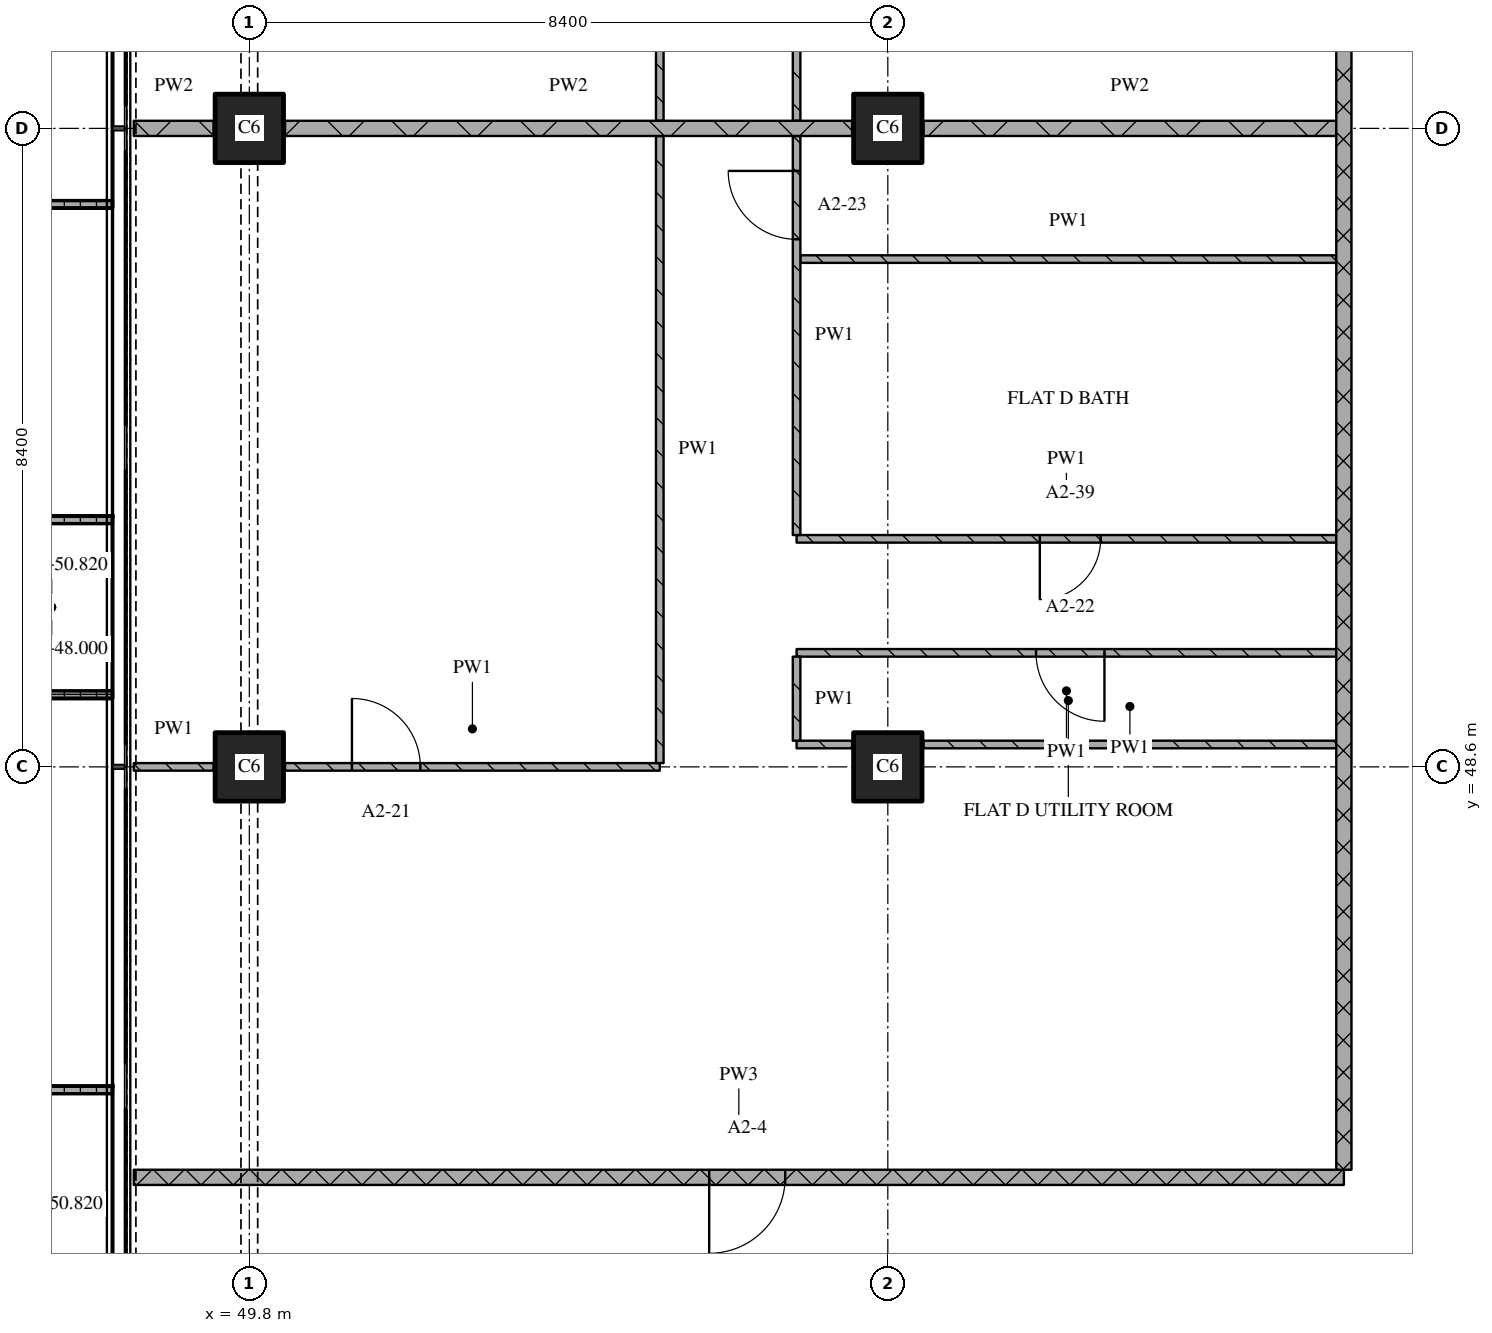
"""IFC4 building model, lengths in metres.
Left out: names, types, materials, properties, quantities, classifications, styles, units other than length and angle.
Written with IfcOpenShell. Run it as: python <this file> out.ifc"""

import sys

from ifc_helpers import new_model, si_unit, direction, frame, frame_2d, origin, origin_2d, place, context, subcontext, project, spatial, polyline, rectangle, outline, extrude, element, fill, save


model = new_model("IFC4")
c1 = context("Model", 3, precision=1e-05, world=origin(), true_north=direction((0.0, 1.0)))
c2 = subcontext(c1, "Body", "Model", "MODEL_VIEW")
j1 = project(units=[si_unit("LENGTHUNIT", "METRE"), si_unit("PLANEANGLEUNIT", "RADIAN")], contexts=[c1])
p1 = place(None, origin())
s1 = spatial("IfcSite", under=j1, at=p1, CompositionType="ELEMENT")
p2 = place(p1, origin())
s2 = spatial("IfcBuilding", under=s1, at=p2, CompositionType="ELEMENT")
p3 = place(p2, frame((0.0, 0.0, 48.0)))
s3 = spatial("IfcBuildingStorey", under=s2, at=p3, CompositionType="ELEMENT", Elevation=48.0)
for number, where, z_axis, x_axis in (
    (1, (49.8, 48.6, 0.0), (0.0, 0.0, 1.0), (1.0, 0.0, 0.0)),
    (2, (49.8, 57.0, 0.0), (0.0, 0.0, 1.0), (1.0, 0.0, 0.0)),
    (3, (58.2, 48.6, 0.0), (0.0, 0.0, 1.0), (1.0, 0.0, 0.0)),
    (4, (58.2, 57.0, 0.0), (0.0, 0.0, 1.0), (1.0, 0.0, 0.0)),
):
    element("IfcColumn", number, at=place(p3, frame(where, z_axis=z_axis, x_axis=x_axis)), inside=s3, PredefinedType="COLUMN", context=c2, shape_type="SweptSolid", body=[
        extrude(rectangle(XDim=0.9, YDim=0.9, at=origin_2d()), origin(), (0.0, 0.0, 1.0), 3.6),
    ])
p4 = place(p3, origin())
e5 = element("IfcWall", 5, at=p4, inside=s3, PredefinedType="SOLIDWALL", context=c2, shape_type="SweptSolid", body=[
    extrude(outline(polyline([(48.0, 62.25), (48.0, 62.15), (46.233, 62.15), (46.233, 56.05), (48.0, 56.05), (48.0, 55.95), (46.133, 55.95), (46.133, 62.25), (48.0, 62.25)])), origin(), (0.0, 0.0, 1.0), 1.0),
])
p5 = place(p3, origin())
e6 = element("IfcWall", 6, at=p5, inside=s3, PredefinedType="SOLIDWALL", context=c2, shape_type="SweptSolid", body=[
    extrude(outline(polyline([(48.0, 51.9), (48.0, 51.8), (46.5, 51.8), (46.5, 49.6), (48.0, 49.6), (48.0, 49.5), (46.4, 49.5), (46.4, 51.9), (48.0, 51.9)])), origin(), (0.0, 0.0, 1.0), 1.0),
])
p6 = place(p3, origin())
e7 = element("IfcWall", 7, at=p6, inside=s3, PredefinedType="SOLIDWALL", context=c2, shape_type="SweptSolid", body=[
    extrude(outline(polyline([(48.0, 44.4), (48.0, 44.3), (46.367, 44.3), (46.367, 40.3), (48.0, 40.3), (48.0, 40.2), (46.267, 40.2), (46.267, 44.4), (48.0, 44.4)])), origin(), (0.0, 0.0, 1.0), 1.0),
])
p7 = place(p3, frame((48.28, 43.2, 0.0), z_axis=(0.0, 0.0, 1.0), x_axis=(1.0, 0.0, 0.0)))
e8 = element("IfcWall", 8, at=p7, inside=s3, PredefinedType="PARTITIONING", context=c2, shape_type="SweptSolid", body=[
    extrude(rectangle(XDim=15.92, YDim=0.2, at=frame_2d((7.96, 0.0))), origin(), (0.0, 0.0, 1.0), 3.32),
])
p8 = place(p7, frame((7.57, 0.0, 0.0)))
e9 = element("IfcOpeningElement", 9, at=p8, cuts=e8, PredefinedType="OPENING", context=c2, shape_type="SweptSolid", body=[
    extrude(rectangle(XDim=1.0, YDim=2.1, at=frame_2d((0.5, 1.05))), frame((0.0, 0.11, 0.0), z_axis=(0.0, -1.0, 0.0), x_axis=(1.0, 0.0, 0.0)), (0.0, 0.0, 1.0), 0.22),
])
p9 = place(p3, frame((48.28, 48.6, 0.0), z_axis=(0.0, 0.0, 1.0), x_axis=(1.0, 0.0, 0.0)))
e10 = element("IfcWall", 10, at=p9, inside=s3, PredefinedType="PARTITIONING", context=c2, shape_type="SweptSolid", body=[
    extrude(rectangle(XDim=1.05, YDim=0.1, at=frame_2d((0.525, 0.0))), origin(), (0.0, 0.0, 1.0), 3.32),
])
p10 = place(p3, frame((50.27, 48.6, 0.0), z_axis=(0.0, 0.0, 1.0), x_axis=(1.0, 0.0, 0.0)))
e11 = element("IfcWall", 11, at=p10, inside=s3, PredefinedType="PARTITIONING", context=c2, shape_type="SweptSolid", body=[
    extrude(rectangle(XDim=4.93, YDim=0.1, at=frame_2d((2.465, 0.0))), origin(), (0.0, 0.0, 1.0), 3.32),
])
p11 = place(p10, frame((0.88, 0.0, 0.0)))
e12 = element("IfcOpeningElement", 12, at=p11, cuts=e11, PredefinedType="OPENING", context=c2, shape_type="SweptSolid", body=[
    extrude(rectangle(XDim=0.9, YDim=2.1, at=frame_2d((0.45, 1.05))), frame((0.0, 0.06, 0.0), z_axis=(0.0, -1.0, 0.0), x_axis=(1.0, 0.0, 0.0)), (0.0, 0.0, 1.0), 0.12),
])
p12 = place(p3, frame((57.0, 48.894, 0.0), z_axis=(0.0, 0.0, 1.0), x_axis=(1.0, 0.0, 0.0)))
e13 = element("IfcWall", 13, at=p12, inside=s3, PredefinedType="PARTITIONING", context=c2, shape_type="SweptSolid", body=[
    extrude(rectangle(XDim=0.73, YDim=0.1, at=frame_2d((0.365, 0.0))), origin(), (0.0, 0.0, 1.0), 3.32),
])
p13 = place(p3, frame((58.67, 48.894, 0.0), z_axis=(0.0, 0.0, 1.0), x_axis=(1.0, 0.0, 0.0)))
e14 = element("IfcWall", 14, at=p13, inside=s3, PredefinedType="PARTITIONING", context=c2, shape_type="SweptSolid", body=[
    extrude(rectangle(XDim=5.43, YDim=0.1, at=frame_2d((2.715, 0.0))), origin(), (0.0, 0.0, 1.0), 3.32),
])
p14 = place(p3, frame((64.1, 50.1, 0.0), z_axis=(0.0, 0.0, 1.0), x_axis=(-1.0, 0.0, 0.0)))
e15 = element("IfcWall", 15, at=p14, inside=s3, PredefinedType="PARTITIONING", context=c2, shape_type="SweptSolid", body=[
    extrude(rectangle(XDim=7.1, YDim=0.1, at=frame_2d((3.55, 0.0))), origin(), (0.0, 0.0, 1.0), 3.32),
])
p15 = place(p14, frame((3.05, 0.0, 0.0)))
e16 = element("IfcOpeningElement", 16, at=p15, cuts=e15, PredefinedType="OPENING", context=c2, shape_type="SweptSolid", body=[
    extrude(rectangle(XDim=0.9, YDim=2.1, at=frame_2d((0.45, 1.05))), frame((0.0, 0.06, 0.0), z_axis=(0.0, -1.0, 0.0), x_axis=(1.0, 0.0, 0.0)), (0.0, 0.0, 1.0), 0.12),
])
p16 = place(p3, frame((57.0, 51.6, 0.0), z_axis=(0.0, 0.0, 1.0), x_axis=(1.0, 0.0, 0.0)))
e17 = element("IfcWall", 17, at=p16, inside=s3, PredefinedType="PARTITIONING", context=c2, shape_type="SweptSolid", body=[
    extrude(rectangle(XDim=7.1, YDim=0.1, at=frame_2d((3.55, 0.0))), origin(), (0.0, 0.0, 1.0), 3.32),
])
p17 = place(p16, frame((3.2, 0.0, 0.0)))
e18 = element("IfcOpeningElement", 18, at=p17, cuts=e17, PredefinedType="OPENING", context=c2, shape_type="SweptSolid", body=[
    extrude(rectangle(XDim=0.8, YDim=2.1, at=frame_2d((0.4, 1.05))), frame((0.0, 0.06, 0.0), z_axis=(0.0, -1.0, 0.0), x_axis=(1.0, 0.0, 0.0)), (0.0, 0.0, 1.0), 0.12),
])
p18 = place(p3, frame((57.05, 55.281, 0.0), z_axis=(0.0, 0.0, 1.0), x_axis=(1.0, 0.0, 0.0)))
e19 = element("IfcWall", 19, at=p18, inside=s3, PredefinedType="PARTITIONING", context=c2, shape_type="SweptSolid", body=[
    extrude(rectangle(XDim=7.05, YDim=0.1, at=frame_2d((3.525, 0.0))), origin(), (0.0, 0.0, 1.0), 3.32),
])
p19 = place(p3, frame((48.28, 57.0, 0.0), z_axis=(0.0, 0.0, 1.0), x_axis=(1.0, 0.0, 0.0)))
e20 = element("IfcWall", 20, at=p19, inside=s3, PredefinedType="PARTITIONING", context=c2, shape_type="SweptSolid", body=[
    extrude(rectangle(XDim=1.05, YDim=0.2, at=frame_2d((0.525, 0.0))), origin(), (0.0, 0.0, 1.0), 3.32),
])
p20 = place(p3, frame((50.27, 57.0, 0.0), z_axis=(0.0, 0.0, 1.0), x_axis=(1.0, 0.0, 0.0)))
e21 = element("IfcWall", 21, at=p20, inside=s3, PredefinedType="PARTITIONING", context=c2, shape_type="SweptSolid", body=[
    extrude(rectangle(XDim=7.46, YDim=0.2, at=frame_2d((3.73, 0.0))), origin(), (0.0, 0.0, 1.0), 3.32),
])
p21 = place(p3, frame((58.67, 57.0, 0.0), z_axis=(0.0, 0.0, 1.0), x_axis=(1.0, 0.0, 0.0)))
e22 = element("IfcWall", 22, at=p21, inside=s3, PredefinedType="PARTITIONING", context=c2, shape_type="SweptSolid", body=[
    extrude(rectangle(XDim=5.43, YDim=0.2, at=frame_2d((2.715, 0.0))), origin(), (0.0, 0.0, 1.0), 3.32),
])
p22 = place(p3, frame((57.0, 50.05, 0.0), z_axis=(0.0, 0.0, 1.0), x_axis=(0.0, -1.0, 0.0)))
e23 = element("IfcWall", 23, at=p22, inside=s3, PredefinedType="PARTITIONING", context=c2, shape_type="SweptSolid", body=[
    extrude(rectangle(XDim=1.106, YDim=0.1, at=frame_2d((0.553, 0.0))), origin(), (0.0, 0.0, 1.0), 3.32),
])
p23 = place(p3, frame((64.2, 43.3, 0.0), z_axis=(0.0, 0.0, 1.0), x_axis=(0.0, 1.0, 0.0)))
e24 = element("IfcWall", 24, at=p23, inside=s3, PredefinedType="PARTITIONING", context=c2, shape_type="SweptSolid", body=[
    extrude(rectangle(XDim=32.02, YDim=0.2, at=frame_2d((16.01, 0.0))), origin(), (0.0, 0.0, 1.0), 3.32),
])
p24 = place(p23, frame((19.95, 0.0, 0.0)))
e25 = element("IfcOpeningElement", 25, at=p24, cuts=e24, PredefinedType="OPENING", context=c2, shape_type="SweptSolid", body=[
    extrude(rectangle(XDim=1.0, YDim=2.1, at=frame_2d((0.5, 1.05))), frame((0.0, 0.11, 0.0), z_axis=(0.0, -1.0, 0.0), x_axis=(1.0, 0.0, 0.0)), (0.0, 0.0, 1.0), 0.22),
])
for number, where, z_axis, x_axis in (
    (26, (55.2, 56.9, 0.0), (0.0, 0.0, 1.0), (0.0, -1.0, 0.0)),
    (27, (55.2, 65.35, 0.0), (0.0, 0.0, 1.0), (0.0, -1.0, 0.0)),
):
    element("IfcWall", number, at=place(p3, frame(where, z_axis=z_axis, x_axis=x_axis)), inside=s3, PredefinedType="PARTITIONING", context=c2, shape_type="SweptSolid", body=[
        extrude(rectangle(XDim=8.25, YDim=0.1, at=frame_2d((4.125, 0.0))), origin(), (0.0, 0.0, 1.0), 3.32),
    ])
p25 = place(p3, frame((57.0, 56.9, 0.0), z_axis=(0.0, 0.0, 1.0), x_axis=(0.0, -1.0, 0.0)))
e28 = element("IfcWall", 28, at=p25, inside=s3, PredefinedType="PARTITIONING", context=c2, shape_type="SweptSolid", body=[
    extrude(rectangle(XDim=5.25, YDim=0.1, at=frame_2d((2.625, 0.0))), origin(), (0.0, 0.0, 1.0), 3.32),
])
p26 = place(p25, frame((0.46, 0.0, 0.0)))
e29 = element("IfcOpeningElement", 29, at=p26, cuts=e28, PredefinedType="OPENING", context=c2, shape_type="SweptSolid", body=[
    extrude(rectangle(XDim=0.9, YDim=2.1, at=frame_2d((0.45, 1.05))), frame((0.0, 0.06, 0.0), z_axis=(0.0, -1.0, 0.0), x_axis=(1.0, 0.0, 0.0)), (0.0, 0.0, 1.0), 0.12),
])
p27 = place(p3, frame((57.0, 62.95, 0.0), z_axis=(0.0, 0.0, 1.0), x_axis=(0.0, -1.0, 0.0)))
e30 = element("IfcWall", 30, at=p27, inside=s3, PredefinedType="PARTITIONING", context=c2, shape_type="SweptSolid", body=[
    extrude(rectangle(XDim=5.85, YDim=0.1, at=frame_2d((2.925, 0.0))), origin(), (0.0, 0.0, 1.0), 3.32),
])
p28 = place(p27, frame((3.71, 0.0, 0.0)))
e31 = element("IfcOpeningElement", 31, at=p28, cuts=e30, PredefinedType="OPENING", context=c2, shape_type="SweptSolid", body=[
    extrude(rectangle(XDim=0.8, YDim=2.1, at=frame_2d((0.4, 1.05))), frame((0.0, 0.06, 0.0), z_axis=(0.0, -1.0, 0.0), x_axis=(1.0, 0.0, 0.0)), (0.0, 0.0, 1.0), 0.12),
])
p29 = place(p8, origin())
e32 = element("IfcDoor", 32, at=p29, inside=s3, OperationType="SINGLE_SWING_RIGHT", PredefinedType="DOOR", context=c2, shape_type="SweptSolid", body=[
    extrude(rectangle(XDim=1.0, YDim=2.1, at=frame_2d((0.5, 1.05))), frame((0.0, 0.025, 0.0), z_axis=(0.0, -1.0, 0.0), x_axis=(1.0, 0.0, 0.0)), (0.0, 0.0, 1.0), 0.05),
])
fill(e9, e32)
p30 = place(p11, origin())
e33 = element("IfcDoor", 33, at=p30, inside=s3, OperationType="SINGLE_SWING_LEFT", PredefinedType="DOOR", context=c2, shape_type="SweptSolid", body=[
    extrude(rectangle(XDim=0.9, YDim=2.1, at=frame_2d((0.45, 1.05))), frame((0.0, 0.025, 0.0), z_axis=(0.0, -1.0, 0.0), x_axis=(1.0, 0.0, 0.0)), (0.0, 0.0, 1.0), 0.05),
])
fill(e12, e33)
p31 = place(p15, origin())
e34 = element("IfcDoor", 34, at=p31, inside=s3, OperationType="SINGLE_SWING_LEFT", PredefinedType="DOOR", context=c2, shape_type="SweptSolid", body=[
    extrude(rectangle(XDim=0.9, YDim=2.1, at=frame_2d((0.45, 1.05))), frame((0.0, 0.025, 0.0), z_axis=(0.0, -1.0, 0.0), x_axis=(1.0, 0.0, 0.0)), (0.0, 0.0, 1.0), 0.05),
])
fill(e16, e34)
p32 = place(p17, origin())
e35 = element("IfcDoor", 35, at=p32, inside=s3, OperationType="SINGLE_SWING_RIGHT", PredefinedType="DOOR", context=c2, shape_type="SweptSolid", body=[
    extrude(rectangle(XDim=0.8, YDim=2.1, at=frame_2d((0.4, 1.05))), frame((0.0, 0.025, 0.0), z_axis=(0.0, -1.0, 0.0), x_axis=(1.0, 0.0, 0.0)), (0.0, 0.0, 1.0), 0.05),
])
fill(e18, e35)
p33 = place(p26, origin())
e36 = element("IfcDoor", 36, at=p33, inside=s3, OperationType="SINGLE_SWING_RIGHT", PredefinedType="DOOR", context=c2, shape_type="SweptSolid", body=[
    extrude(rectangle(XDim=0.9, YDim=2.1, at=frame_2d((0.45, 1.05))), frame((0.0, 0.025, 0.0), z_axis=(0.0, -1.0, 0.0), x_axis=(1.0, 0.0, 0.0)), (0.0, 0.0, 1.0), 0.05),
])
fill(e29, e36)
save(model, sys.argv[1])
